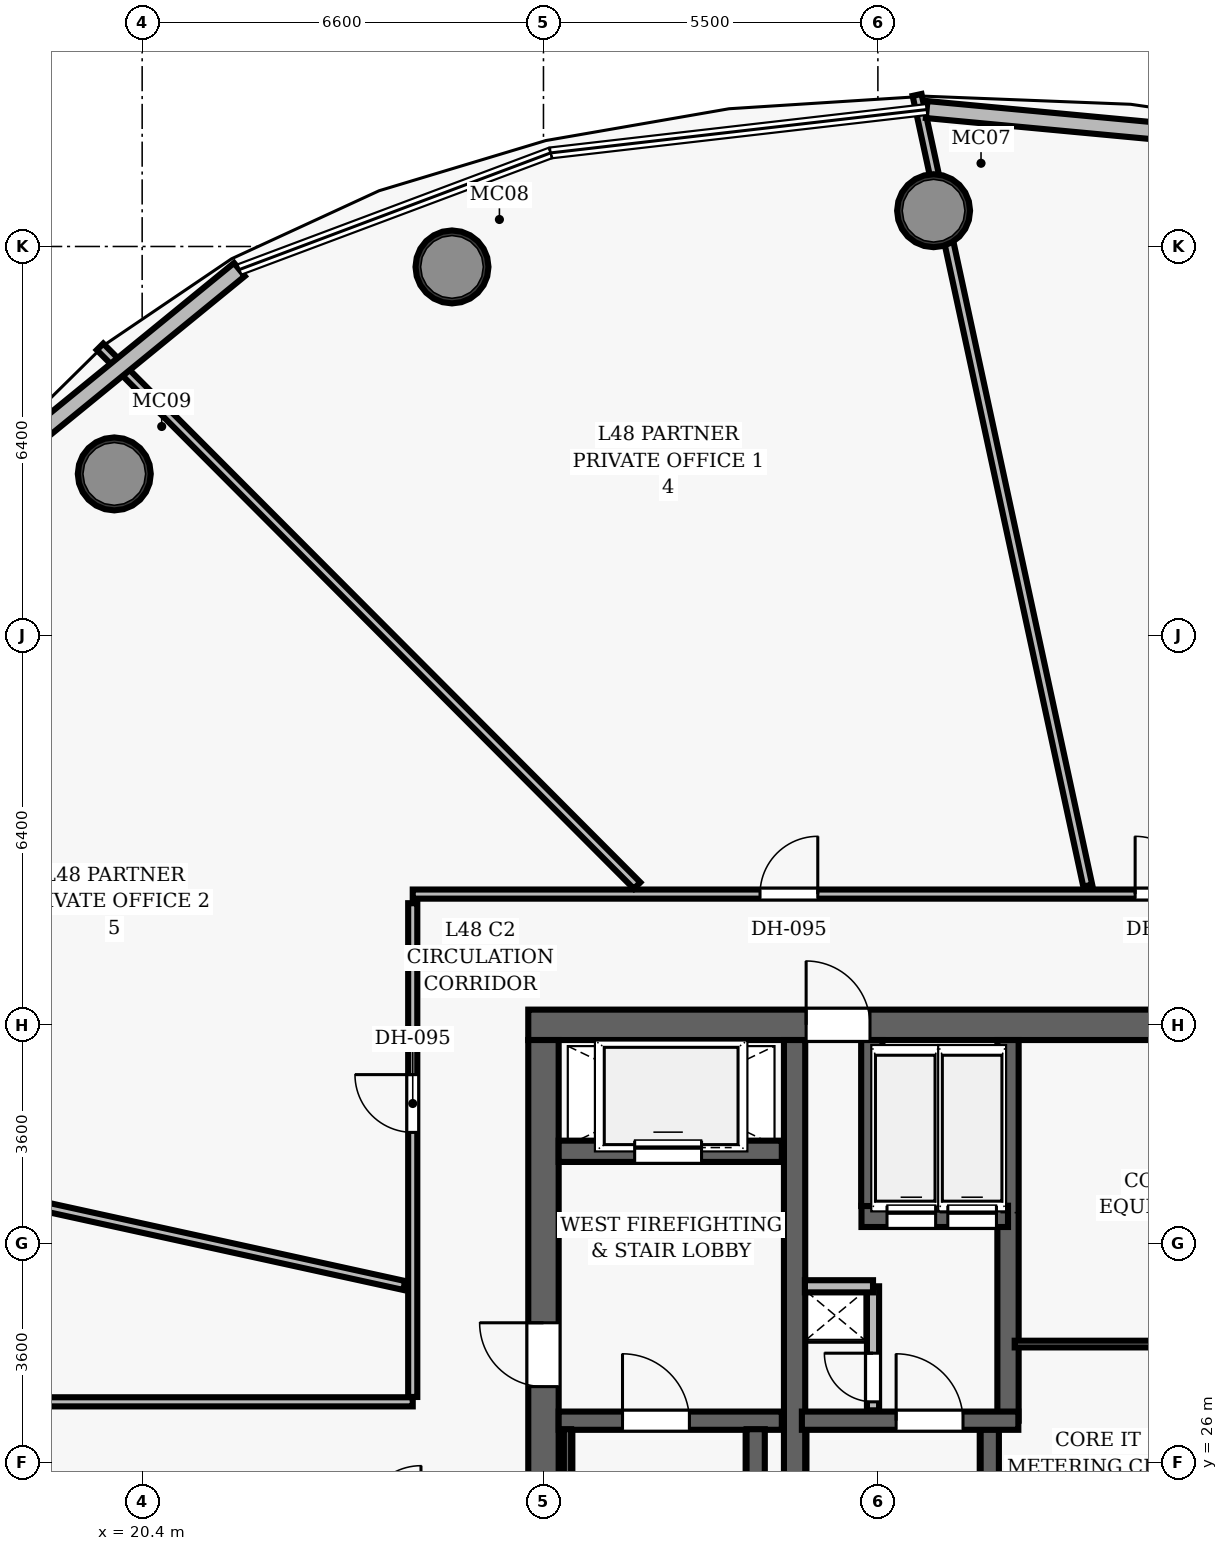
"""IFC4 building model, lengths in metres.
Left out: names, types, materials, properties, quantities, classifications, styles, units other than length and angle.
Written with IfcOpenShell. Run it as: python <this file> out.ifc"""

import sys

from ifc_helpers import new_model, si_unit, direction, frame, frame_2d, origin, origin_2d, place, context, subcontext, project, spatial, rectangle, hollow_circle, extrude, element, fill, save


model = new_model("IFC4")
c1 = context("Model", 3, precision=1e-05, world=origin(), true_north=direction((0.0, 1.0)))
c2 = subcontext(c1, "Body", "Model", "MODEL_VIEW")
j1 = project(units=[si_unit("LENGTHUNIT", "METRE"), si_unit("PLANEANGLEUNIT", "RADIAN")], contexts=[c1])
p1 = place(None, origin())
s1 = spatial("IfcSite", under=j1, at=p1, CompositionType="ELEMENT")
p2 = place(p1, origin())
s2 = spatial("IfcBuilding", under=s1, at=p2, CompositionType="ELEMENT")
p3 = place(p2, frame((0.0, 0.0, 190.45)))
s3 = spatial("IfcBuildingStorey", under=s2, at=p3, CompositionType="ELEMENT", Elevation=190.45)
p4 = place(p3, frame((26.75, 33.2, 0.0), z_axis=(0.0, 0.0, 1.0), x_axis=(1.0, 0.0, 0.0)))
e1 = element("IfcWall", 1, at=p4, inside=s3, PredefinedType="SHEAR", context=c2, shape_type="SweptSolid", body=[
    extrude(rectangle(XDim=22.5, YDim=0.5, at=frame_2d((11.25, 0.0))), origin(), (0.0, 0.0, 1.0), 3.85),
])
p5 = place(p4, frame((4.57, 0.0, 0.0)))
e2 = element("IfcOpeningElement", 2, at=p5, cuts=e1, PredefinedType="OPENING", context=c2, shape_type="SweptSolid", body=[
    extrude(rectangle(XDim=1.05, YDim=2.15, at=frame_2d((0.525, 1.075))), frame((0.0, 0.26, 0.0), z_axis=(0.0, -1.0, 0.0), x_axis=(1.0, 0.0, 0.0)), (0.0, 0.0, 1.0), 0.52),
])
p6 = place(p4, frame((14.47, 0.0, 0.0)))
e3 = element("IfcOpeningElement", 3, at=p6, cuts=e1, PredefinedType="OPENING", context=c2, shape_type="SweptSolid", body=[
    extrude(rectangle(XDim=1.05, YDim=2.15, at=frame_2d((0.525, 1.075))), frame((0.0, 0.26, 0.0), z_axis=(0.0, -1.0, 0.0), x_axis=(1.0, 0.0, 0.0)), (0.0, 0.0, 1.0), 0.52),
])
p7 = place(p3, frame((27.0, 19.05, 0.0), z_axis=(0.0, 0.0, 1.0), x_axis=(0.0, 1.0, 0.0)))
e4 = element("IfcWall", 4, at=p7, inside=s3, PredefinedType="SHEAR", context=c2, shape_type="SweptSolid", body=[
    extrude(rectangle(XDim=13.9, YDim=0.5, at=frame_2d((6.95, 0.0))), origin(), (0.0, 0.0, 1.0), 3.85),
])
p8 = place(p7, frame((8.2, 0.0, 0.0)))
e5 = element("IfcOpeningElement", 5, at=p8, cuts=e4, PredefinedType="OPENING", context=c2, shape_type="SweptSolid", body=[
    extrude(rectangle(XDim=1.05, YDim=2.15, at=frame_2d((0.525, 1.075))), frame((0.0, 0.26, 0.0), z_axis=(0.0, -1.0, 0.0), x_axis=(1.0, 0.0, 0.0)), (0.0, 0.0, 1.0), 0.52),
])
p9 = place(p3, frame((31.13, 19.05, 0.0), z_axis=(0.0, 0.0, 1.0), x_axis=(0.0, 1.0, 0.0)))
e6 = element("IfcWall", 6, at=p9, inside=s3, PredefinedType="SHEAR", context=c2, shape_type="SweptSolid", body=[
    extrude(rectangle(XDim=13.9, YDim=0.35, at=frame_2d((6.95, 0.0))), origin(), (0.0, 0.0, 1.0), 3.85),
])
for number, where, z_axis, x_axis in (
    (7, (33.416, 46.588, 0.0), (0.0, 0.0, 1.0), (1.0, 0.0, 0.0)),
    (8, (25.496, 45.664, 0.0), (0.0, 0.0, 1.0), (1.0, 0.0, 0.0)),
    (9, (19.942, 42.26, 0.0), (0.0, 0.0, 1.0), (1.0, 0.0, 0.0)),
):
    element("IfcColumn", number, at=place(p3, frame(where, z_axis=z_axis, x_axis=x_axis)), inside=s3, PredefinedType="COLUMN", context=c2, shape_type="SweptSolid", body=[
        extrude(hollow_circle(Radius=0.6, WallThickness=0.05, at=origin_2d()), origin(), (0.0, 0.0, 1.0), 3.85),
    ])
p10 = place(p3, frame((27.25, 26.69, 0.0), z_axis=(0.0, 0.0, 1.0), x_axis=(1.0, 0.0, 0.0)))
e10 = element("IfcWall", 10, at=p10, inside=s3, PredefinedType="SHEAR", context=c2, shape_type="SweptSolid", body=[
    extrude(rectangle(XDim=3.67, YDim=0.3, at=frame_2d((1.835, 0.0))), origin(), (0.0, 0.0, 1.0), 3.85),
])
p11 = place(p10, frame((1.05, 0.0, 0.0)))
e11 = element("IfcOpeningElement", 11, at=p11, cuts=e10, PredefinedType="OPENING", context=c2, shape_type="SweptSolid", body=[
    extrude(rectangle(XDim=1.1, YDim=2.15, at=frame_2d((0.55, 1.075))), frame((0.0, 0.16, 0.0), z_axis=(0.0, -1.0, 0.0), x_axis=(1.0, 0.0, 0.0)), (0.0, 0.0, 1.0), 0.32),
])
p12 = place(p3, frame((30.49, 19.05, 0.0), z_axis=(0.0, 0.0, 1.0), x_axis=(0.0, 1.0, 0.0)))
e12 = element("IfcWall", 12, at=p12, inside=s3, PredefinedType="SHEAR", context=c2, shape_type="SweptSolid", body=[
    extrude(rectangle(XDim=7.5, YDim=0.3, at=frame_2d((3.75, 0.0))), origin(), (0.0, 0.0, 1.0), 3.85),
])
p13 = place(p3, frame((27.395, 19.1, 0.0), z_axis=(0.0, 0.0, 1.0), x_axis=(0.0, 1.0, 0.0)))
e13 = element("IfcWall", 13, at=p13, inside=s3, PredefinedType="SHEAR", context=c2, shape_type="SweptSolid", body=[
    extrude(rectangle(XDim=7.45, YDim=0.12, at=frame_2d((3.725, 0.0))), origin(), (0.0, 0.0, 1.0), 3.85),
])
p14 = place(p3, frame((27.25, 31.12, 0.0), z_axis=(0.0, 0.0, 1.0), x_axis=(1.0, 0.0, 0.0)))
e14 = element("IfcWall", 14, at=p14, inside=s3, PredefinedType="SHEAR", context=c2, shape_type="SweptSolid", body=[
    extrude(rectangle(XDim=3.67, YDim=0.35, at=frame_2d((1.835, 0.0))), origin(), (0.0, 0.0, 1.0), 3.035),
])
p15 = place(p14, frame((1.25, 0.0, 0.0)))
e15 = element("IfcOpeningElement", 15, at=p15, cuts=e14, PredefinedType="OPENING", context=c2, shape_type="SweptSolid", body=[
    extrude(rectangle(XDim=1.1, YDim=2.15, at=frame_2d((0.55, 1.075))), frame((0.0, 0.185, 0.0), z_axis=(0.0, -1.0, 0.0), x_axis=(1.0, 0.0, 0.0)), (0.0, 0.0, 1.0), 0.37),
])
p16 = place(p3, frame((34.34, 19.05, 0.0), z_axis=(0.0, 0.0, 1.0), x_axis=(0.0, 1.0, 0.0)))
e16 = element("IfcWall", 16, at=p16, inside=s3, PredefinedType="SHEAR", context=c2, shape_type="SweptSolid", body=[
    extrude(rectangle(XDim=7.5, YDim=0.3, at=frame_2d((3.75, 0.0))), origin(), (0.0, 0.0, 1.0), 3.85),
])
p17 = place(p3, frame((34.64, 26.69, 0.0), z_axis=(0.0, 0.0, 1.0), x_axis=(0.0, 1.0, 0.0)))
e17 = element("IfcWall", 17, at=p17, inside=s3, PredefinedType="SHEAR", context=c2, shape_type="SweptSolid", body=[
    extrude(rectangle(XDim=6.26, YDim=0.35, at=frame_2d((3.13, 0.0))), origin(), (0.0, 0.0, 1.0), 3.85),
])
p18 = place(p3, frame((31.25, 26.69, 0.0), z_axis=(0.0, 0.0, 1.0), x_axis=(1.0, 0.0, 0.0)))
e18 = element("IfcWall", 18, at=p18, inside=s3, PredefinedType="SHEAR", context=c2, shape_type="SweptSolid", body=[
    extrude(rectangle(XDim=3.56, YDim=0.3, at=frame_2d((1.78, 0.0))), origin(), (0.0, 0.0, 1.0), 3.85),
])
p19 = place(p18, frame((1.55, 0.0, 0.0)))
e19 = element("IfcOpeningElement", 19, at=p19, cuts=e18, PredefinedType="OPENING", context=c2, shape_type="SweptSolid", body=[
    extrude(rectangle(XDim=1.1, YDim=2.15, at=frame_2d((0.55, 1.075))), frame((0.0, 0.16, 0.0), z_axis=(0.0, -1.0, 0.0), x_axis=(1.0, 0.0, 0.0)), (0.0, 0.0, 1.0), 0.32),
])
p20 = place(p3, frame((32.23, 30.05, 0.0), z_axis=(0.0, 0.0, 1.0), x_axis=(1.0, 0.0, 0.0)))
e20 = element("IfcWall", 20, at=p20, inside=s3, PredefinedType="SHEAR", context=c2, shape_type="SweptSolid", body=[
    extrude(rectangle(XDim=2.41, YDim=0.35, at=frame_2d((1.205, 0.0))), origin(), (0.0, 0.0, 1.0), 3.035),
])
p21 = place(p20, frame((0.42, 0.0, 0.0)))
e21 = element("IfcOpeningElement", 21, at=p21, cuts=e20, PredefinedType="OPENING", context=c2, shape_type="SweptSolid", body=[
    extrude(rectangle(XDim=0.8, YDim=2.15, at=frame_2d((0.4, 1.075))), frame((0.0, 0.185, 0.0), z_axis=(0.0, -1.0, 0.0), x_axis=(1.0, 0.0, 0.0)), (0.0, 0.0, 1.0), 0.37),
])
p22 = place(p20, frame((1.42, 0.0, 0.0)))
e22 = element("IfcOpeningElement", 22, at=p22, cuts=e20, PredefinedType="OPENING", context=c2, shape_type="SweptSolid", body=[
    extrude(rectangle(XDim=0.8, YDim=2.15, at=frame_2d((0.4, 1.075))), frame((0.0, 0.185, 0.0), z_axis=(0.0, -1.0, 0.0), x_axis=(1.0, 0.0, 0.0)), (0.0, 0.0, 1.0), 0.37),
])
p23 = place(p3, frame((32.4, 30.22, 0.0), z_axis=(0.0, 0.0, 1.0), x_axis=(0.0, 1.0, 0.0)))
e23 = element("IfcWall", 23, at=p23, inside=s3, PredefinedType="SHEAR", context=c2, shape_type="SweptSolid", body=[
    extrude(rectangle(XDim=2.73, YDim=0.35, at=frame_2d((1.365, 0.0))), origin(), (0.0, 0.0, 1.0), 3.035),
])
p24 = place(p3, frame((32.42, 26.86, 0.0), z_axis=(0.0, 0.0, 1.0), x_axis=(0.0, 1.0, 0.0)))
e24 = element("IfcWall", 24, at=p24, inside=s3, PredefinedType="PARTITIONING", context=c2, shape_type="SweptSolid", body=[
    extrude(rectangle(XDim=2.04, YDim=0.2, at=frame_2d((1.02, 0.0))), origin(), (0.0, 0.0, 1.0), 3.035),
])
p25 = place(p24, frame((0.14, 0.0, 0.0)))
e25 = element("IfcOpeningElement", 25, at=p25, cuts=e24, PredefinedType="OPENING", context=c2, shape_type="SweptSolid", body=[
    extrude(rectangle(XDim=0.8, YDim=2.05, at=frame_2d((0.4, 1.025))), frame((0.0, 0.11, 0.0), z_axis=(0.0, -1.0, 0.0), x_axis=(1.0, 0.0, 0.0)), (0.0, 0.0, 1.0), 0.22),
])
p26 = place(p3, frame((31.3, 28.9, 0.0), z_axis=(0.0, 0.0, 1.0), x_axis=(1.0, 0.0, 0.0)))
e26 = element("IfcWall", 26, at=p26, inside=s3, PredefinedType="PARTITIONING", context=c2, shape_type="SweptSolid", body=[
    extrude(rectangle(XDim=1.12, YDim=0.2, at=frame_2d((0.56, 0.0))), origin(), (0.0, 0.0, 1.0), 3.035),
])
p27 = place(p3, frame((34.75, 27.95, 0.0), z_axis=(0.0, 0.0, 1.0), x_axis=(1.0, 0.0, 0.0)))
e27 = element("IfcWall", 27, at=p27, inside=s3, PredefinedType="PARTITIONING", context=c2, shape_type="SweptSolid", body=[
    extrude(rectangle(XDim=6.25, YDim=0.11, at=frame_2d((3.125, 0.0))), origin(), (0.0, 0.0, 1.0), 3.035),
])
p28 = place(p3, frame((24.85, 35.35, 0.0), z_axis=(0.0, 0.0, 1.0), x_axis=(1.0, 0.0, 0.0)))
e28 = element("IfcWall", 28, at=p28, inside=s3, PredefinedType="PARTITIONING", context=c2, shape_type="SweptSolid", body=[
    extrude(rectangle(XDim=26.0, YDim=0.15, at=frame_2d((13.0, 0.0))), origin(), (0.0, 0.0, 1.0), 3.035),
])
p29 = place(p28, frame((18.327, 0.0, 0.0)))
e29 = element("IfcOpeningElement", 29, at=p29, cuts=e28, PredefinedType="OPENING", context=c2, shape_type="SweptSolid", body=[
    extrude(rectangle(XDim=0.95, YDim=2.15, at=frame_2d((0.475, 1.075))), frame((0.0, 0.085, 0.0), z_axis=(0.0, -1.0, 0.0), x_axis=(1.0, 0.0, 0.0)), (0.0, 0.0, 1.0), 0.17),
])
p30 = place(p28, frame((11.881, 0.0, 0.0)))
e30 = element("IfcOpeningElement", 30, at=p30, cuts=e28, PredefinedType="OPENING", context=c2, shape_type="SweptSolid", body=[
    extrude(rectangle(XDim=0.95, YDim=2.15, at=frame_2d((0.475, 1.075))), frame((0.0, 0.085, 0.0), z_axis=(0.0, -1.0, 0.0), x_axis=(1.0, 0.0, 0.0)), (0.0, 0.0, 1.0), 0.17),
])
p31 = place(p28, frame((5.711, 0.0, 0.0)))
e31 = element("IfcOpeningElement", 31, at=p31, cuts=e28, PredefinedType="OPENING", context=c2, shape_type="SweptSolid", body=[
    extrude(rectangle(XDim=0.95, YDim=2.15, at=frame_2d((0.475, 1.075))), frame((0.0, 0.085, 0.0), z_axis=(0.0, -1.0, 0.0), x_axis=(1.0, 0.0, 0.0)), (0.0, 0.0, 1.0), 0.17),
])
p32 = place(p3, frame((24.85, 27.08, 0.0), z_axis=(0.0, 0.0, 1.0), x_axis=(0.0, 1.0, 0.0)))
e32 = element("IfcWall", 32, at=p32, inside=s3, PredefinedType="PARTITIONING", context=c2, shape_type="SweptSolid", body=[
    extrude(rectangle(XDim=8.12, YDim=0.15, at=frame_2d((4.06, 0.0))), origin(), (0.0, 0.0, 1.0), 3.035),
])
p33 = place(p32, frame((4.351, 0.0, 0.0)))
e33 = element("IfcOpeningElement", 33, at=p33, cuts=e32, PredefinedType="OPENING", context=c2, shape_type="SweptSolid", body=[
    extrude(rectangle(XDim=0.95, YDim=2.15, at=frame_2d((0.475, 1.075))), frame((0.0, 0.085, 0.0), z_axis=(0.0, -1.0, 0.0), x_axis=(1.0, 0.0, 0.0)), (0.0, 0.0, 1.0), 0.17),
])
p34 = place(p3, frame((17.492, 27.0, 0.0), z_axis=(0.0, 0.0, 1.0), x_axis=(1.0, 0.0, 0.0)))
e34 = element("IfcWall", 34, at=p34, inside=s3, PredefinedType="PARTITIONING", context=c2, shape_type="SweptSolid", body=[
    extrude(rectangle(XDim=7.358, YDim=0.15, at=frame_2d((3.679, 0.0))), origin(), (0.0, 0.0, 1.0), 3.035),
])
p35 = place(p3, frame((35.951, 35.49, 0.0), z_axis=(0.0, 0.0, 1.0), x_axis=(-0.211016689377, 0.977482458566, 0.0)))
e35 = element("IfcWall", 35, at=p35, inside=s3, PredefinedType="PARTITIONING", context=c2, shape_type="SweptSolid", body=[
    extrude(rectangle(XDim=13.302, YDim=0.15, at=frame_2d((6.651, 0.0))), origin(), (0.0, 0.0, 1.0), 3.035),
])
p36 = place(p3, frame((28.54, 35.49, 0.0), z_axis=(0.0, 0.0, 1.0), x_axis=(-0.705983856865, 0.708227925068, 0.0)))
e36 = element("IfcWall", 36, at=p36, inside=s3, PredefinedType="PARTITIONING", context=c2, shape_type="SweptSolid", body=[
    extrude(rectangle(XDim=12.511, YDim=0.15, at=frame_2d((6.256, 0.0))), origin(), (0.0, 0.0, 1.0), 3.035),
])
p37 = place(p3, frame((24.71, 28.913, 0.0), z_axis=(0.0, 0.0, 1.0), x_axis=(-0.97680395447, 0.214135551772, 0.0)))
e37 = element("IfcWall", 37, at=p37, inside=s3, PredefinedType="PARTITIONING", context=c2, shape_type="SweptSolid", body=[
    extrude(rectangle(XDim=10.307, YDim=0.15, at=frame_2d((5.153, 0.0))), origin(), (0.0, 0.0, 1.0), 3.035),
])
p38 = place(p3, frame((33.302, 48.252, 0.0), z_axis=(0.0, 0.0, 1.0), x_axis=(0.995647175429, -0.093202478833, 0.0)))
e38 = element("IfcWall", 38, at=p38, inside=s3, PredefinedType="SOLIDWALL", context=c2, shape_type="SweptSolid", body=[
    extrude(rectangle(XDim=6.784, YDim=0.28, at=frame_2d((3.392, 0.0))), origin(), (0.0, 0.0, 1.0), 3.62),
])
p39 = place(p3, frame((18.222, 42.537, 0.0), z_axis=(0.0, 0.0, 1.0), x_axis=(0.77459712555, 0.632454973172, 0.0)))
e39 = element("IfcWall", 39, at=p39, inside=s3, PredefinedType="SOLIDWALL", context=c2, shape_type="SweptSolid", body=[
    extrude(rectangle(XDim=4.876, YDim=0.28, at=frame_2d((2.438, 0.0))), origin(), (0.0, 0.0, 1.0), 3.62),
])
p40 = place(p11, origin())
e40 = element("IfcDoor", 40, at=p40, inside=s3, OperationType="SINGLE_SWING_LEFT", PredefinedType="DOOR", context=c2, shape_type="SweptSolid", body=[
    extrude(rectangle(XDim=1.1, YDim=2.15, at=frame_2d((0.55, 1.075))), frame((0.0, 0.025, 0.0), z_axis=(0.0, -1.0, 0.0), x_axis=(1.0, 0.0, 0.0)), (0.0, 0.0, 1.0), 0.05),
])
fill(e11, e40)
p41 = place(p8, origin())
e41 = element("IfcDoor", 41, at=p41, inside=s3, OperationType="SINGLE_SWING_RIGHT", PredefinedType="DOOR", context=c2, shape_type="SweptSolid", body=[
    extrude(rectangle(XDim=1.05, YDim=2.15, at=frame_2d((0.525, 1.075))), frame((0.0, 0.025, 0.0), z_axis=(0.0, -1.0, 0.0), x_axis=(1.0, 0.0, 0.0)), (0.0, 0.0, 1.0), 0.05),
])
fill(e5, e41)
p42 = place(p19, origin())
e42 = element("IfcDoor", 42, at=p42, inside=s3, OperationType="SINGLE_SWING_LEFT", PredefinedType="DOOR", context=c2, shape_type="SweptSolid", body=[
    extrude(rectangle(XDim=1.1, YDim=2.15, at=frame_2d((0.55, 1.075))), frame((0.0, 0.025, 0.0), z_axis=(0.0, -1.0, 0.0), x_axis=(1.0, 0.0, 0.0)), (0.0, 0.0, 1.0), 0.05),
])
fill(e19, e42)
p43 = place(p25, origin())
e43 = element("IfcDoor", 43, at=p43, inside=s3, OperationType="SINGLE_SWING_RIGHT", PredefinedType="DOOR", context=c2, shape_type="SweptSolid", body=[
    extrude(rectangle(XDim=0.8, YDim=2.05, at=frame_2d((0.4, 1.025))), frame((0.0, 0.025, 0.0), z_axis=(0.0, -1.0, 0.0), x_axis=(1.0, 0.0, 0.0)), (0.0, 0.0, 1.0), 0.05),
])
fill(e25, e43)
p44 = place(p5, origin())
e44 = element("IfcDoor", 44, at=p44, inside=s3, OperationType="SINGLE_SWING_LEFT", PredefinedType="DOOR", context=c2, shape_type="SweptSolid", body=[
    extrude(rectangle(XDim=1.05, YDim=2.15, at=frame_2d((0.525, 1.075))), frame((0.0, 0.025, 0.0), z_axis=(0.0, -1.0, 0.0), x_axis=(1.0, 0.0, 0.0)), (0.0, 0.0, 1.0), 0.05),
])
fill(e2, e44)
p45 = place(p30, origin())
e45 = element("IfcDoor", 45, at=p45, inside=s3, OperationType="SINGLE_SWING_LEFT", PredefinedType="DOOR", context=c2, shape_type="SweptSolid", body=[
    extrude(rectangle(XDim=0.95, YDim=2.15, at=frame_2d((0.475, 1.075))), frame((0.0, 0.025, 0.0), z_axis=(0.0, -1.0, 0.0), x_axis=(1.0, 0.0, 0.0)), (0.0, 0.0, 1.0), 0.05),
])
fill(e30, e45)
p46 = place(p31, origin())
e46 = element("IfcDoor", 46, at=p46, inside=s3, OperationType="SINGLE_SWING_RIGHT", PredefinedType="DOOR", context=c2, shape_type="SweptSolid", body=[
    extrude(rectangle(XDim=0.95, YDim=2.15, at=frame_2d((0.475, 1.075))), frame((0.0, 0.025, 0.0), z_axis=(0.0, -1.0, 0.0), x_axis=(1.0, 0.0, 0.0)), (0.0, 0.0, 1.0), 0.05),
])
fill(e31, e46)
p47 = place(p33, origin())
e47 = element("IfcDoor", 47, at=p47, inside=s3, OperationType="SINGLE_SWING_RIGHT", PredefinedType="DOOR", context=c2, shape_type="SweptSolid", body=[
    extrude(rectangle(XDim=0.95, YDim=2.15, at=frame_2d((0.475, 1.075))), frame((0.0, 0.025, 0.0), z_axis=(0.0, -1.0, 0.0), x_axis=(1.0, 0.0, 0.0)), (0.0, 0.0, 1.0), 0.05),
])
fill(e33, e47)
p48 = place(p15, origin())
e48 = element("IfcDoor", 48, at=p48, inside=s3, OperationType="SLIDING_TO_LEFT", PredefinedType="DOOR", context=c2, shape_type="SweptSolid", body=[
    extrude(rectangle(XDim=1.1, YDim=2.15, at=frame_2d((0.55, 1.075))), frame((0.0, 0.025, 0.0), z_axis=(0.0, -1.0, 0.0), x_axis=(1.0, 0.0, 0.0)), (0.0, 0.0, 1.0), 0.05),
])
fill(e15, e48)
p49 = place(p21, origin())
e49 = element("IfcDoor", 49, at=p49, inside=s3, OperationType="SLIDING_TO_LEFT", PredefinedType="DOOR", context=c2, shape_type="SweptSolid", body=[
    extrude(rectangle(XDim=0.8, YDim=2.15, at=frame_2d((0.4, 1.075))), frame((0.0, 0.025, 0.0), z_axis=(0.0, -1.0, 0.0), x_axis=(1.0, 0.0, 0.0)), (0.0, 0.0, 1.0), 0.05),
])
fill(e21, e49)
p50 = place(p22, origin())
e50 = element("IfcDoor", 50, at=p50, inside=s3, OperationType="SLIDING_TO_LEFT", PredefinedType="DOOR", context=c2, shape_type="SweptSolid", body=[
    extrude(rectangle(XDim=0.8, YDim=2.15, at=frame_2d((0.4, 1.075))), frame((0.0, 0.025, 0.0), z_axis=(0.0, -1.0, 0.0), x_axis=(1.0, 0.0, 0.0)), (0.0, 0.0, 1.0), 0.05),
])
fill(e22, e50)
save(model, sys.argv[1])
